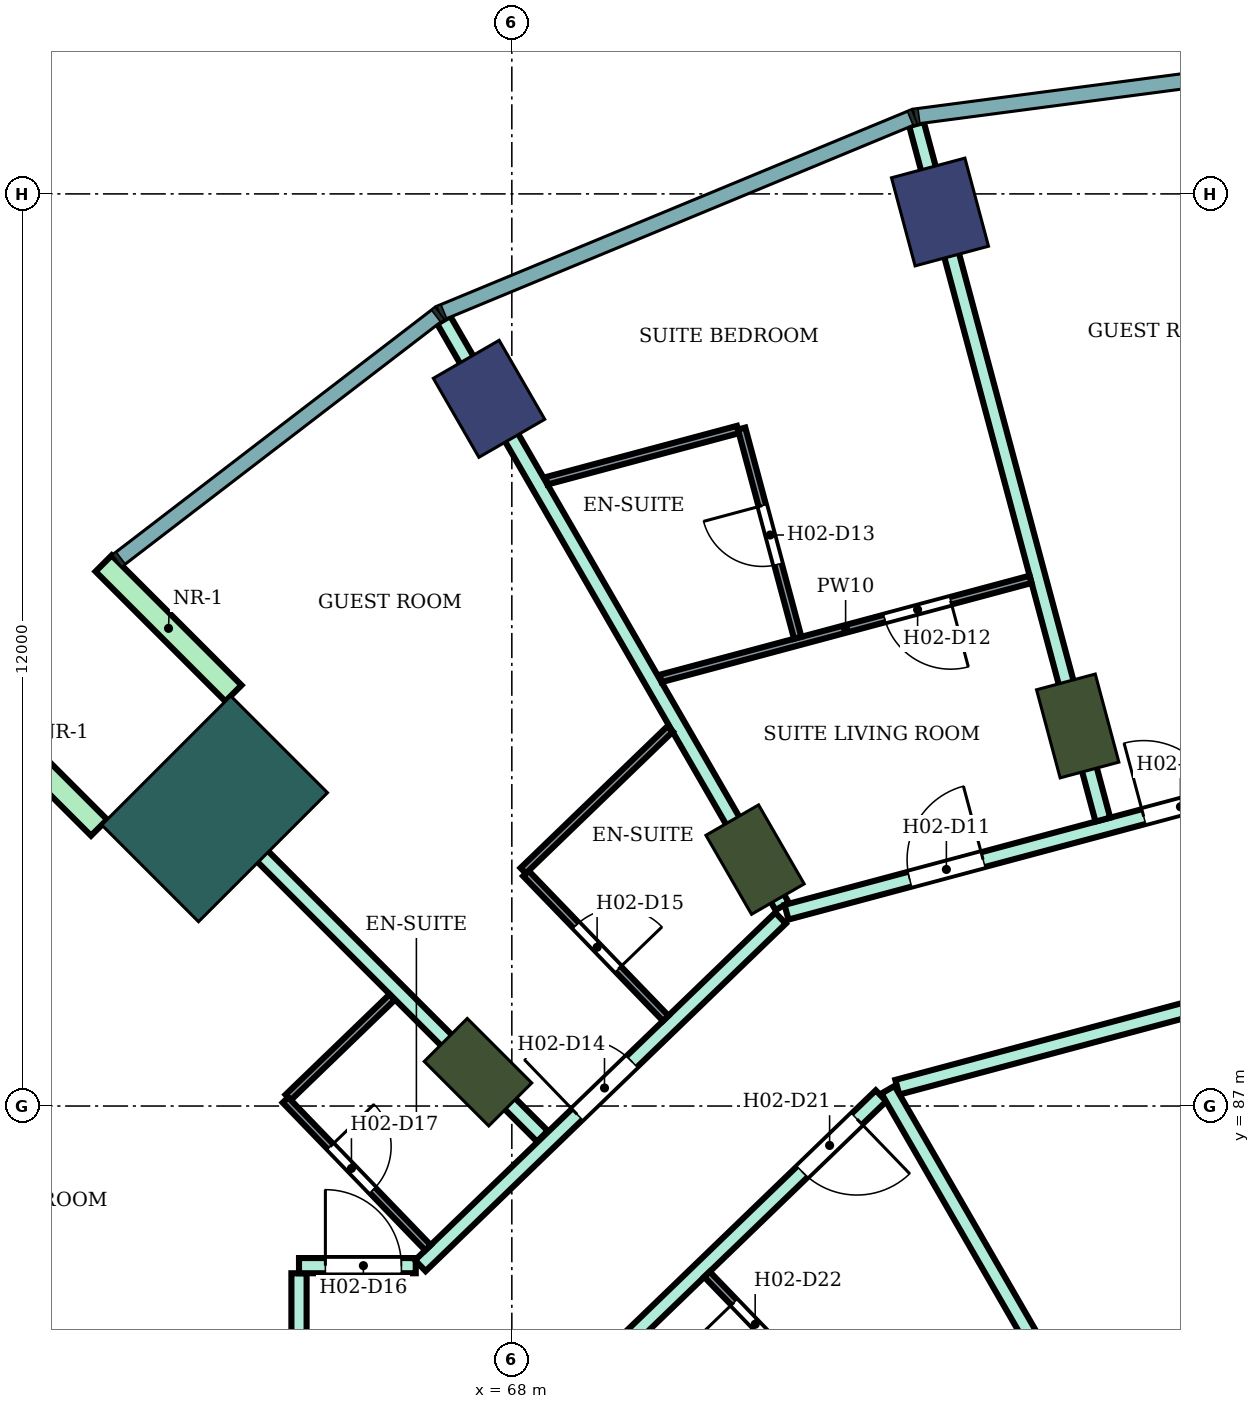
"""IFC4 building model, lengths in metres.
Left out: names, types, materials, properties, quantities, classifications, styles, units other than length and angle.
Written with IfcOpenShell. Run it as: python <this file> out.ifc"""

import sys

from ifc_helpers import new_model, si_unit, direction, frame, frame_2d, origin, origin_2d, place, context, subcontext, project, spatial, rectangle, extrude, element, fill, save


model = new_model("IFC4")
c1 = context("Model", 3, precision=1e-05, world=origin(), true_north=direction((0.0, 1.0)))
c2 = subcontext(c1, "Body", "Model", "MODEL_VIEW")
j1 = project(units=[si_unit("LENGTHUNIT", "METRE"), si_unit("PLANEANGLEUNIT", "RADIAN")], contexts=[c1])
p1 = place(None, origin())
s1 = spatial("IfcSite", under=j1, at=p1, CompositionType="ELEMENT")
p2 = place(p1, origin())
s2 = spatial("IfcBuilding", under=s1, at=p2, CompositionType="ELEMENT")
p3 = place(p2, frame((0.0, 0.0, 44.0)))
s3 = spatial("IfcBuildingStorey", under=s2, at=p3, CompositionType="ELEMENT", Elevation=44.0)
for number, where, z_axis, x_axis in (
    (1, (73.633, 98.762, 0.0), (0.0, 0.0, 1.0), (-0.259, 0.966, 0.0)),
    (2, (67.7, 96.304, 0.0), (0.0, 0.0, 1.0), (-0.5, 0.866, 0.0)),
):
    element("IfcColumn", number, at=place(p3, frame(where, z_axis=z_axis, x_axis=x_axis)), inside=s3, PredefinedType="COLUMN", context=c2, shape_type="SweptSolid", body=[
        extrude(rectangle(XDim=1.2, YDim=1.0, at=origin_2d()), origin(), (0.0, 0.0, 1.0), 3.8),
    ])
for number, where, z_axis, x_axis in (
    (3, (75.445, 92.0, 0.0), (0.0, 0.0, 1.0), (-0.259, 0.966, 0.0)),
    (4, (71.2, 90.242, 0.0), (0.0, 0.0, 1.0), (-0.5, 0.866, 0.0)),
    (5, (67.555, 87.445, 0.0), (0.0, 0.0, 1.0), (-0.707, 0.707, 0.0)),
):
    element("IfcColumn", number, at=place(p3, frame(where, z_axis=z_axis, x_axis=x_axis)), inside=s3, PredefinedType="COLUMN", context=c2, shape_type="SweptSolid", body=[
        extrude(rectangle(XDim=1.2, YDim=0.8, at=origin_2d()), origin(), (0.0, 0.0, 1.0), 3.8),
    ])
p4 = place(p3, frame((64.09, 90.91, 0.0), z_axis=(0.0, 0.0, 1.0), x_axis=(-0.707106781187, 0.707106781187, 0.0)))
e6 = element("IfcColumn", 6, at=p4, inside=s3, PredefinedType="COLUMN", context=c2, shape_type="SweptSolid", body=[
    extrude(rectangle(XDim=1.8, YDim=2.4, at=origin_2d()), origin(), (0.0, 0.0, 1.0), 3.8),
])
for number, where, z_axis, x_axis in (
    (7, (64.338, 92.43, 0.0), (0.0, 0.0, 1.0), (-0.707, 0.707, 0.0)),
    (8, (62.57, 90.662, 0.0), (0.0, 0.0, 1.0), (-0.707, 0.707, 0.0)),
):
    element("IfcWall", number, at=place(p3, frame(where, z_axis=z_axis, x_axis=x_axis)), inside=s3, PredefinedType="NOTDEFINED", context=c2, shape_type="SweptSolid", body=[
        extrude(rectangle(XDim=2.416, YDim=0.3, at=frame_2d((1.208, 0.0))), origin(), (0.0, 0.0, 1.0), 3.8),
    ])
p5 = place(p3, frame((63.599, 91.408, 0.0), z_axis=(0.0, 0.0, 1.0), x_axis=(0.706981017422, -0.707232522587, 0.0)))
e9 = element("IfcWall", 9, at=p5, inside=s3, PredefinedType="PARTITIONING", context=c2, shape_type="SweptSolid", body=[
    extrude(rectangle(XDim=6.795, YDim=0.2, at=frame_2d((3.397, 0.0))), origin(), (0.0, 0.0, 1.0), 3.35),
])
p6 = place(p3, frame((65.2, 83.401, 0.0), z_axis=(0.0, 0.0, 1.0), x_axis=(0.0, 1.0, 0.0)))
e10 = element("IfcWall", 10, at=p6, inside=s3, PredefinedType="PARTITIONING", context=c2, shape_type="SweptSolid", body=[
    extrude(rectangle(XDim=1.399, YDim=0.2, at=frame_2d((0.7, 0.0))), origin(), (0.0, 0.0, 1.0), 3.35),
])
p7 = place(p3, frame((65.2, 84.9, 0.0), z_axis=(0.0, 0.0, 1.0), x_axis=(1.0, 0.0, 0.0)))
e11 = element("IfcWall", 11, at=p7, inside=s3, PredefinedType="PARTITIONING", context=c2, shape_type="SweptSolid", body=[
    extrude(rectangle(XDim=1.536, YDim=0.2, at=frame_2d((0.768, 0.0))), origin(), (0.0, 0.0, 1.0), 3.35),
])
p8 = place(p7, frame((0.347, 0.0, 0.0)))
e12 = element("IfcOpeningElement", 12, at=p8, cuts=e11, PredefinedType="OPENING", context=c2, shape_type="SweptSolid", body=[
    extrude(rectangle(XDim=1.0, YDim=2.1, at=frame_2d((0.5, 1.05))), frame((0.0, 0.11, 0.0), z_axis=(0.0, -1.0, 0.0), x_axis=(1.0, 0.0, 0.0)), (0.0, 0.0, 1.0), 0.22),
])
p9 = place(p3, frame((66.796, 84.9, 0.0), z_axis=(0.0, 0.0, 1.0), x_axis=(0.719690131178, 0.694295409092, 0.0)))
e13 = element("IfcWall", 13, at=p9, inside=s3, PredefinedType="PARTITIONING", context=c2, shape_type="SweptSolid", body=[
    extrude(rectangle(XDim=6.585, YDim=0.2, at=frame_2d((3.293, 0.0))), origin(), (0.0, 0.0, 1.0), 3.35),
])
p10 = place(p9, frame((2.867, 0.0, 0.0)))
e14 = element("IfcOpeningElement", 14, at=p10, cuts=e13, PredefinedType="OPENING", context=c2, shape_type="SweptSolid", body=[
    extrude(rectangle(XDim=1.0, YDim=2.1, at=frame_2d((0.5, 1.05))), frame((0.0, 0.11, 0.0), z_axis=(0.0, -1.0, 0.0), x_axis=(1.0, 0.0, 0.0)), (0.0, 0.0, 1.0), 0.22),
])
p11 = place(p3, frame((67.103, 97.343, 0.0), z_axis=(0.0, 0.0, 1.0), x_axis=(0.499900389553, -0.866082906265, 0.0)))
e15 = element("IfcWall", 15, at=p11, inside=s3, PredefinedType="PARTITIONING", context=c2, shape_type="SweptSolid", body=[
    extrude(rectangle(XDim=8.908, YDim=0.2, at=frame_2d((4.454, 0.0))), origin(), (0.0, 0.0, 1.0), 3.35),
])
p12 = place(p3, frame((68.987, 83.4, 0.0), z_axis=(0.0, 0.0, 1.0), x_axis=(0.719591503389, 0.694397629784, 0.0)))
e16 = element("IfcWall", 16, at=p12, inside=s3, PredefinedType="PARTITIONING", context=c2, shape_type="SweptSolid", body=[
    extrude(rectangle(XDim=5.378, YDim=0.2, at=frame_2d((2.689, 0.0))), origin(), (0.0, 0.0, 1.0), 3.35),
])
p13 = place(p12, frame((3.938, 0.0, 0.0)))
e17 = element("IfcOpeningElement", 17, at=p13, cuts=e16, PredefinedType="OPENING", context=c2, shape_type="SweptSolid", body=[
    extrude(rectangle(XDim=1.0, YDim=2.1, at=frame_2d((0.5, 1.05))), frame((0.0, 0.11, 0.0), z_axis=(0.0, -1.0, 0.0), x_axis=(1.0, 0.0, 0.0)), (0.0, 0.0, 1.0), 0.22),
])
p14 = place(p3, frame((71.614, 89.55, 0.0), z_axis=(0.0, 0.0, 1.0), x_axis=(0.96597505802, 0.258635239832, 0.0)))
e18 = element("IfcWall", 18, at=p14, inside=s3, PredefinedType="PARTITIONING", context=c2, shape_type="SweptSolid", body=[
    extrude(rectangle(XDim=8.592, YDim=0.2, at=frame_2d((4.296, 0.0))), origin(), (0.0, 0.0, 1.0), 3.35),
])
p15 = place(p14, frame((4.865, 0.0, 0.0)))
e19 = element("IfcOpeningElement", 19, at=p15, cuts=e18, PredefinedType="OPENING", context=c2, shape_type="SweptSolid", body=[
    extrude(rectangle(XDim=1.0, YDim=2.1, at=frame_2d((0.5, 1.05))), frame((0.0, 0.11, 0.0), z_axis=(0.0, -1.0, 0.0), x_axis=(1.0, 0.0, 0.0)), (0.0, 0.0, 1.0), 0.22),
])
p16 = place(p14, frame((1.677, 0.0, 0.0)))
e20 = element("IfcOpeningElement", 20, at=p16, cuts=e18, PredefinedType="OPENING", context=c2, shape_type="SweptSolid", body=[
    extrude(rectangle(XDim=1.0, YDim=2.1, at=frame_2d((0.5, 1.05))), frame((0.0, 0.11, 0.0), z_axis=(0.0, -1.0, 0.0), x_axis=(1.0, 0.0, 0.0)), (0.0, 0.0, 1.0), 0.22),
])
p17 = place(p3, frame((73.071, 87.247, 0.0), z_axis=(0.0, 0.0, 1.0), x_axis=(0.965920206274, 0.258840018373, 0.0)))
e21 = element("IfcWall", 21, at=p17, inside=s3, PredefinedType="PARTITIONING", context=c2, shape_type="SweptSolid", body=[
    extrude(rectangle(XDim=7.123, YDim=0.2, at=frame_2d((3.562, 0.0))), origin(), (0.0, 0.0, 1.0), 3.35),
])
p18 = place(p3, frame((72.949, 87.215, 0.0), z_axis=(0.0, 0.0, 1.0), x_axis=(0.499890755261, -0.866088467077, 0.0)))
e22 = element("IfcWall", 22, at=p18, inside=s3, PredefinedType="PARTITIONING", context=c2, shape_type="SweptSolid", body=[
    extrude(rectangle(XDim=6.404, YDim=0.2, at=frame_2d((3.202, 0.0))), origin(), (0.0, 0.0, 1.0), 3.35),
])
p19 = place(p3, frame((73.323, 99.919, 0.0), z_axis=(0.0, 0.0, 1.0), x_axis=(0.258786746607, -0.965934480066, 0.0)))
e23 = element("IfcWall", 23, at=p19, inside=s3, PredefinedType="PARTITIONING", context=c2, shape_type="SweptSolid", body=[
    extrude(rectangle(XDim=9.475, YDim=0.2, at=frame_2d((4.737, 0.0))), origin(), (0.0, 0.0, 1.0), 3.35),
])
p20 = place(p3, frame((65.058, 87.114, 0.0), z_axis=(0.0, 0.0, 1.0), x_axis=(0.719715847356, 0.694268751324, 0.0)))
e24 = element("IfcWall", 24, at=p20, inside=s3, PredefinedType="PARTITIONING", context=c2, shape_type="SweptSolid", body=[
    extrude(rectangle(XDim=1.9, YDim=0.1, at=frame_2d((0.95, 0.0))), origin(), (0.0, 0.0, 1.0), 3.35),
])
p21 = place(p3, frame((65.022, 87.079, 0.0), z_axis=(0.0, 0.0, 1.0), x_axis=(0.694287838235, -0.719697434815, 0.0)))
e25 = element("IfcWall", 25, at=p21, inside=s3, PredefinedType="PARTITIONING", context=c2, shape_type="SweptSolid", body=[
    extrude(rectangle(XDim=2.7, YDim=0.1, at=frame_2d((1.35, 0.0))), origin(), (0.0, 0.0, 1.0), 3.35),
])
p22 = place(p21, frame((0.85, 0.0, 0.0)))
e26 = element("IfcOpeningElement", 26, at=p22, cuts=e25, PredefinedType="OPENING", context=c2, shape_type="SweptSolid", body=[
    extrude(rectangle(XDim=0.8, YDim=2.1, at=frame_2d((0.4, 1.05))), frame((0.0, 0.06, 0.0), z_axis=(0.0, -1.0, 0.0), x_axis=(1.0, 0.0, 0.0)), (0.0, 0.0, 1.0), 0.12),
])
p23 = place(p3, frame((68.185, 90.06, 0.0), z_axis=(0.0, 0.0, 1.0), x_axis=(0.69446127412, -0.719530081892, 0.0)))
e27 = element("IfcWall", 27, at=p23, inside=s3, PredefinedType="PARTITIONING", context=c2, shape_type="SweptSolid", body=[
    extrude(rectangle(XDim=2.649, YDim=0.1, at=frame_2d((1.324, 0.0))), origin(), (0.0, 0.0, 1.0), 3.35),
])
p24 = place(p23, frame((0.95, 0.0, 0.0)))
e28 = element("IfcOpeningElement", 28, at=p24, cuts=e27, PredefinedType="OPENING", context=c2, shape_type="SweptSolid", body=[
    extrude(rectangle(XDim=0.8, YDim=2.1, at=frame_2d((0.4, 1.05))), frame((0.0, 0.06, 0.0), z_axis=(0.0, -1.0, 0.0), x_axis=(1.0, 0.0, 0.0)), (0.0, 0.0, 1.0), 0.12),
])
p25 = place(p3, frame((68.15, 90.096, 0.0), z_axis=(0.0, 0.0, 1.0), x_axis=(0.719623741095, 0.69436422089, 0.0)))
e29 = element("IfcWall", 29, at=p25, inside=s3, PredefinedType="PARTITIONING", context=c2, shape_type="SweptSolid", body=[
    extrude(rectangle(XDim=2.687, YDim=0.1, at=frame_2d((1.344, 0.0))), origin(), (0.0, 0.0, 1.0), 3.35),
])
p26 = place(p3, frame((68.457, 95.225, 0.0), z_axis=(0.0, 0.0, 1.0), x_axis=(0.965887416682, 0.258962349183, 0.0)))
e30 = element("IfcWall", 30, at=p26, inside=s3, PredefinedType="PARTITIONING", context=c2, shape_type="SweptSolid", body=[
    extrude(rectangle(XDim=2.607, YDim=0.1, at=frame_2d((1.303, 0.0))), origin(), (0.0, 0.0, 1.0), 3.35),
])
p27 = place(p3, frame((69.958, 92.625, 0.0), z_axis=(0.0, 0.0, 1.0), x_axis=(0.96595043048, 0.258727203548, 0.0)))
e31 = element("IfcWall", 31, at=p27, inside=s3, PredefinedType="PARTITIONING", context=c2, shape_type="SweptSolid", body=[
    extrude(rectangle(XDim=5.038, YDim=0.1, at=frame_2d((2.519, 0.0))), origin(), (0.0, 0.0, 1.0), 3.35),
])
p28 = place(p27, frame((3.049, 0.0, 0.0)))
e32 = element("IfcOpeningElement", 32, at=p28, cuts=e31, PredefinedType="OPENING", context=c2, shape_type="SweptSolid", body=[
    extrude(rectangle(XDim=0.9, YDim=2.1, at=frame_2d((0.45, 1.05))), frame((0.0, 0.06, 0.0), z_axis=(0.0, -1.0, 0.0), x_axis=(1.0, 0.0, 0.0)), (0.0, 0.0, 1.0), 0.12),
])
p29 = place(p3, frame((70.567, 84.786, 0.0), z_axis=(0.0, 0.0, 1.0), x_axis=(0.694447472534, -0.719543402368, 0.0)))
e33 = element("IfcWall", 33, at=p29, inside=s3, PredefinedType="PARTITIONING", context=c2, shape_type="SweptSolid", body=[
    extrude(rectangle(XDim=1.926, YDim=0.1, at=frame_2d((0.963, 0.0))), origin(), (0.0, 0.0, 1.0), 3.35),
])
p30 = place(p29, frame((0.513, 0.0, 0.0)))
e34 = element("IfcOpeningElement", 34, at=p30, cuts=e33, PredefinedType="OPENING", context=c2, shape_type="SweptSolid", body=[
    extrude(rectangle(XDim=0.8, YDim=2.1, at=frame_2d((0.4, 1.05))), frame((0.0, 0.06, 0.0), z_axis=(0.0, -1.0, 0.0), x_axis=(1.0, 0.0, 0.0)), (0.0, 0.0, 1.0), 0.12),
])
p31 = place(p3, frame((71.023, 95.913, 0.0), z_axis=(0.0, 0.0, 1.0), x_axis=(0.258968734817, -0.965885704619, 0.0)))
e35 = element("IfcWall", 35, at=p31, inside=s3, PredefinedType="PARTITIONING", context=c2, shape_type="SweptSolid", body=[
    extrude(rectangle(XDim=2.85, YDim=0.1, at=frame_2d((1.425, 0.0))), origin(), (0.0, 0.0, 1.0), 3.35),
])
p32 = place(p31, frame((1.05, 0.0, 0.0)))
e36 = element("IfcOpeningElement", 36, at=p32, cuts=e35, PredefinedType="OPENING", context=c2, shape_type="SweptSolid", body=[
    extrude(rectangle(XDim=0.8, YDim=2.1, at=frame_2d((0.4, 1.05))), frame((0.0, 0.06, 0.0), z_axis=(0.0, -1.0, 0.0), x_axis=(1.0, 0.0, 0.0)), (0.0, 0.0, 1.0), 0.12),
])
p33 = place(p15, origin())
e37 = element("IfcDoor", 37, at=p33, inside=s3, OperationType="SINGLE_SWING_LEFT", PredefinedType="DOOR", context=c2, shape_type="SweptSolid", body=[
    extrude(rectangle(XDim=1.0, YDim=2.1, at=frame_2d((0.5, 1.05))), frame((0.0, 0.025, 0.0), z_axis=(0.0, -1.0, 0.0), x_axis=(1.0, 0.0, 0.0)), (0.0, 0.0, 1.0), 0.05),
])
fill(e19, e37)
p34 = place(p16, origin())
e38 = element("IfcDoor", 38, at=p34, inside=s3, OperationType="SINGLE_SWING_RIGHT", PredefinedType="DOOR", context=c2, shape_type="SweptSolid", body=[
    extrude(rectangle(XDim=1.0, YDim=2.1, at=frame_2d((0.5, 1.05))), frame((0.0, 0.025, 0.0), z_axis=(0.0, -1.0, 0.0), x_axis=(1.0, 0.0, 0.0)), (0.0, 0.0, 1.0), 0.05),
])
fill(e20, e38)
p35 = place(p28, frame((0.9, 0.0, 0.0), z_axis=(0.0, 0.0, 1.0), x_axis=(-1.0, 0.0, 0.0)))
e39 = element("IfcDoor", 39, at=p35, inside=s3, OperationType="SINGLE_SWING_LEFT", PredefinedType="DOOR", context=c2, shape_type="SweptSolid", body=[
    extrude(rectangle(XDim=0.9, YDim=2.1, at=frame_2d((0.45, 1.05))), frame((0.0, 0.025, 0.0), z_axis=(0.0, -1.0, 0.0), x_axis=(1.0, 0.0, 0.0)), (0.0, 0.0, 1.0), 0.05),
])
fill(e32, e39)
p36 = place(p32, frame((0.8, 0.0, 0.0), z_axis=(0.0, 0.0, 1.0), x_axis=(-1.0, 0.0, 0.0)))
e40 = element("IfcDoor", 40, at=p36, inside=s3, OperationType="SINGLE_SWING_RIGHT", PredefinedType="DOOR", context=c2, shape_type="SweptSolid", body=[
    extrude(rectangle(XDim=0.8, YDim=2.1, at=frame_2d((0.4, 1.05))), frame((0.0, 0.025, 0.0), z_axis=(0.0, -1.0, 0.0), x_axis=(1.0, 0.0, 0.0)), (0.0, 0.0, 1.0), 0.05),
])
fill(e36, e40)
p37 = place(p10, origin())
e41 = element("IfcDoor", 41, at=p37, inside=s3, OperationType="SINGLE_SWING_LEFT", PredefinedType="DOOR", context=c2, shape_type="SweptSolid", body=[
    extrude(rectangle(XDim=1.0, YDim=2.1, at=frame_2d((0.5, 1.05))), frame((0.0, 0.025, 0.0), z_axis=(0.0, -1.0, 0.0), x_axis=(1.0, 0.0, 0.0)), (0.0, 0.0, 1.0), 0.05),
])
fill(e14, e41)
p38 = place(p24, origin())
e42 = element("IfcDoor", 42, at=p38, inside=s3, OperationType="SINGLE_SWING_RIGHT", PredefinedType="DOOR", context=c2, shape_type="SweptSolid", body=[
    extrude(rectangle(XDim=0.8, YDim=2.1, at=frame_2d((0.4, 1.05))), frame((0.0, 0.025, 0.0), z_axis=(0.0, -1.0, 0.0), x_axis=(1.0, 0.0, 0.0)), (0.0, 0.0, 1.0), 0.05),
])
fill(e28, e42)
p39 = place(p8, origin())
e43 = element("IfcDoor", 43, at=p39, inside=s3, OperationType="SINGLE_SWING_LEFT", PredefinedType="DOOR", context=c2, shape_type="SweptSolid", body=[
    extrude(rectangle(XDim=1.0, YDim=2.1, at=frame_2d((0.5, 1.05))), frame((0.0, 0.025, 0.0), z_axis=(0.0, -1.0, 0.0), x_axis=(1.0, 0.0, 0.0)), (0.0, 0.0, 1.0), 0.05),
])
fill(e12, e43)
p40 = place(p22, origin())
e44 = element("IfcDoor", 44, at=p40, inside=s3, OperationType="SINGLE_SWING_LEFT", PredefinedType="DOOR", context=c2, shape_type="SweptSolid", body=[
    extrude(rectangle(XDim=0.8, YDim=2.1, at=frame_2d((0.4, 1.05))), frame((0.0, 0.025, 0.0), z_axis=(0.0, -1.0, 0.0), x_axis=(1.0, 0.0, 0.0)), (0.0, 0.0, 1.0), 0.05),
])
fill(e26, e44)
p41 = place(p13, frame((1.0, 0.0, 0.0), z_axis=(0.0, 0.0, 1.0), x_axis=(-1.0, 0.0, 0.0)))
e45 = element("IfcDoor", 45, at=p41, inside=s3, OperationType="SINGLE_SWING_LEFT", PredefinedType="DOOR", context=c2, shape_type="SweptSolid", body=[
    extrude(rectangle(XDim=1.0, YDim=2.1, at=frame_2d((0.5, 1.05))), frame((0.0, 0.025, 0.0), z_axis=(0.0, -1.0, 0.0), x_axis=(1.0, 0.0, 0.0)), (0.0, 0.0, 1.0), 0.05),
])
fill(e17, e45)
p42 = place(p30, frame((0.8, 0.0, 0.0), z_axis=(0.0, 0.0, 1.0), x_axis=(-1.0, 0.0, 0.0)))
e46 = element("IfcDoor", 46, at=p42, inside=s3, OperationType="SINGLE_SWING_RIGHT", PredefinedType="DOOR", context=c2, shape_type="SweptSolid", body=[
    extrude(rectangle(XDim=0.8, YDim=2.1, at=frame_2d((0.4, 1.05))), frame((0.0, 0.025, 0.0), z_axis=(0.0, -1.0, 0.0), x_axis=(1.0, 0.0, 0.0)), (0.0, 0.0, 1.0), 0.05),
])
fill(e34, e46)
save(model, sys.argv[1])
